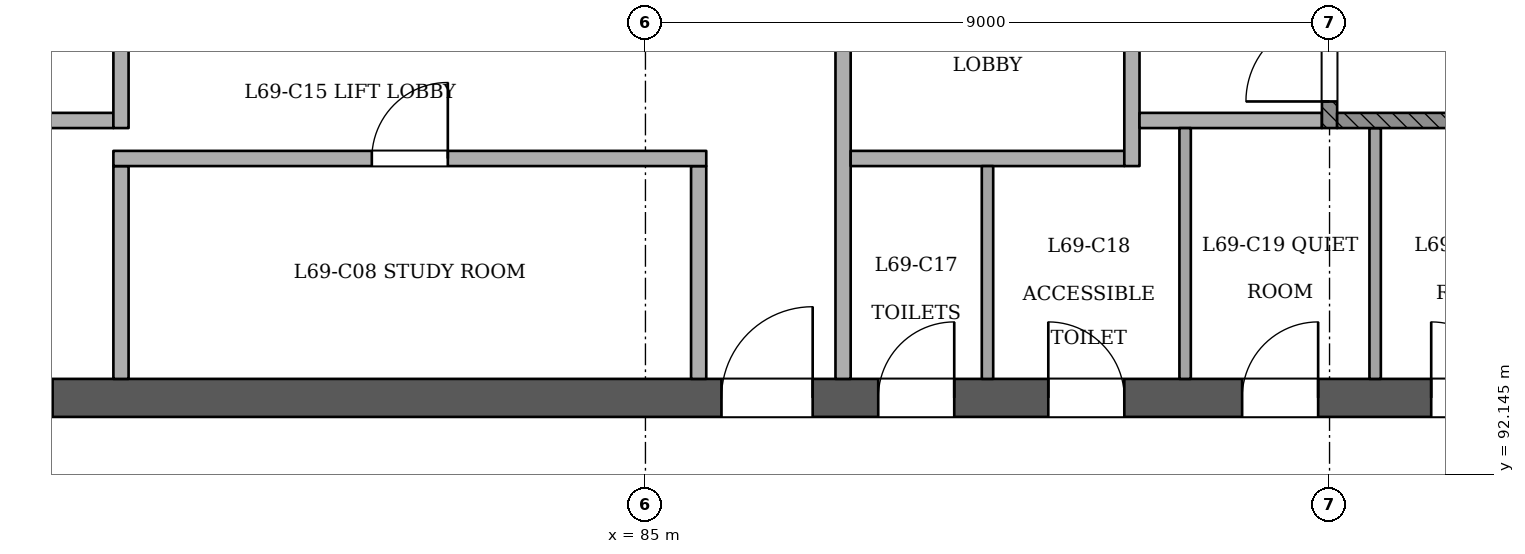
"""IFC4 building model, lengths in metres.
Left out: names, types, materials, properties, quantities, classifications, styles, units other than length and angle.
Written with IfcOpenShell. Run it as: python <this file> out.ifc"""

import sys

from ifc_helpers import new_model, si_unit, direction, frame, frame_2d, origin, place, context, subcontext, project, spatial, rectangle, extrude, element, fill, save


model = new_model("IFC4")
c1 = context("Model", 3, precision=1e-05, world=origin(), true_north=direction((0.0, 1.0)))
c2 = subcontext(c1, "Body", "Model", "MODEL_VIEW")
j1 = project(units=[si_unit("LENGTHUNIT", "METRE"), si_unit("PLANEANGLEUNIT", "RADIAN")], contexts=[c1])
p1 = place(None, origin())
s1 = spatial("IfcSite", under=j1, at=p1, CompositionType="ELEMENT")
p2 = place(p1, origin())
s2 = spatial("IfcBuilding", under=s1, at=p2, CompositionType="ELEMENT")
p3 = place(p2, frame((0.0, 0.0, 268.0)))
s3 = spatial("IfcBuildingStorey", under=s2, at=p3, CompositionType="ELEMENT", Elevation=268.0)
p4 = place(p3, frame((72.75, 93.15, 0.0), z_axis=(0.0, 0.0, 1.0), x_axis=(1.0, 0.0, 0.0)))
e1 = element("IfcWall", 1, at=p4, inside=s3, PredefinedType="SHEAR", context=c2, shape_type="SweptSolid", body=[
    extrude(rectangle(XDim=24.75, YDim=0.5, at=frame_2d((12.375, 0.0))), origin(), (0.0, 0.0, 1.0), 3.6),
])
p5 = place(p4, frame((1.05, 0.0, 0.0)))
e2 = element("IfcOpeningElement", 2, at=p5, cuts=e1, PredefinedType="OPENING", context=c2, shape_type="SweptSolid", body=[
    extrude(rectangle(XDim=1.2, YDim=2.1, at=frame_2d((0.6, 1.05))), frame((0.0, 0.26, 0.0), z_axis=(0.0, -1.0, 0.0), x_axis=(1.0, 0.0, 0.0)), (0.0, 0.0, 1.0), 0.521),
])
p6 = place(p4, frame((3.25, 0.0, 0.0)))
e3 = element("IfcOpeningElement", 3, at=p6, cuts=e1, PredefinedType="OPENING", context=c2, shape_type="SweptSolid", body=[
    extrude(rectangle(XDim=1.2, YDim=2.1, at=frame_2d((0.6, 1.05))), frame((0.0, 0.26, 0.0), z_axis=(0.0, -1.0, 0.0), x_axis=(1.0, 0.0, 0.0)), (0.0, 0.0, 1.0), 0.521),
])
p7 = place(p4, frame((13.25, 0.0, 0.0)))
e4 = element("IfcOpeningElement", 4, at=p7, cuts=e1, PredefinedType="OPENING", context=c2, shape_type="SweptSolid", body=[
    extrude(rectangle(XDim=1.2, YDim=2.1, at=frame_2d((0.6, 1.05))), frame((0.0, 0.26, 0.0), z_axis=(0.0, -1.0, 0.0), x_axis=(1.0, 0.0, 0.0)), (0.0, 0.0, 1.0), 0.521),
])
p8 = place(p4, frame((15.312, 0.0, 0.0)))
e5 = element("IfcOpeningElement", 5, at=p8, cuts=e1, PredefinedType="OPENING", context=c2, shape_type="SweptSolid", body=[
    extrude(rectangle(XDim=1.0, YDim=2.1, at=frame_2d((0.5, 1.05))), frame((0.0, 0.26, 0.0), z_axis=(0.0, -1.0, 0.0), x_axis=(1.0, 0.0, 0.0)), (0.0, 0.0, 1.0), 0.521),
])
p9 = place(p4, frame((17.55, 0.0, 0.0)))
e6 = element("IfcOpeningElement", 6, at=p9, cuts=e1, PredefinedType="OPENING", context=c2, shape_type="SweptSolid", body=[
    extrude(rectangle(XDim=1.0, YDim=2.1, at=frame_2d((0.5, 1.05))), frame((0.0, 0.26, 0.0), z_axis=(0.0, -1.0, 0.0), x_axis=(1.0, 0.0, 0.0)), (0.0, 0.0, 1.0), 0.521),
])
p10 = place(p4, frame((20.1, 0.0, 0.0)))
e7 = element("IfcOpeningElement", 7, at=p10, cuts=e1, PredefinedType="OPENING", context=c2, shape_type="SweptSolid", body=[
    extrude(rectangle(XDim=1.0, YDim=2.1, at=frame_2d((0.5, 1.05))), frame((0.0, 0.26, 0.0), z_axis=(0.0, -1.0, 0.0), x_axis=(1.0, 0.0, 0.0)), (0.0, 0.0, 1.0), 0.521),
])
p11 = place(p4, frame((22.587, 0.0, 0.0)))
e8 = element("IfcOpeningElement", 8, at=p11, cuts=e1, PredefinedType="OPENING", context=c2, shape_type="SweptSolid", body=[
    extrude(rectangle(XDim=1.0, YDim=2.1, at=frame_2d((0.5, 1.05))), frame((0.0, 0.26, 0.0), z_axis=(0.0, -1.0, 0.0), x_axis=(1.0, 0.0, 0.0)), (0.0, 0.0, 1.0), 0.521),
])
for number, where, z_axis, x_axis in (
    (9, (78.1, 93.4, 0.0), (0.0, 0.0, 1.0), (0.0, 1.0, 0.0)),
    (10, (85.7, 93.4, 0.0), (0.0, 0.0, 1.0), (0.0, 1.0, 0.0)),
):
    element("IfcWall", number, at=place(p3, frame(where, z_axis=z_axis, x_axis=x_axis)), inside=s3, PredefinedType="PARTITIONING", context=c2, shape_type="SweptSolid", body=[
        extrude(rectangle(XDim=2.8, YDim=0.2, at=frame_2d((1.4, 0.0))), origin(), (0.0, 0.0, 1.0), 3.2),
    ])
p12 = place(p3, frame((87.6, 93.4, 0.0), z_axis=(0.0, 0.0, 1.0), x_axis=(0.0, 1.0, 0.0)))
e11 = element("IfcWall", 11, at=p12, inside=s3, PredefinedType="PARTITIONING", context=c2, shape_type="SweptSolid", body=[
    extrude(rectangle(XDim=7.0, YDim=0.2, at=frame_2d((3.5, 0.0))), origin(), (0.0, 0.0, 1.0), 3.2),
])
p13 = place(p12, frame((4.45, 0.0, 0.0)))
e12 = element("IfcOpeningElement", 12, at=p13, cuts=e11, PredefinedType="OPENING", context=c2, shape_type="SweptSolid", body=[
    extrude(rectangle(XDim=1.1, YDim=2.1, at=frame_2d((0.55, 1.05))), frame((0.0, 0.11, 0.0), z_axis=(0.0, -1.0, 0.0), x_axis=(1.0, 0.0, 0.0)), (0.0, 0.0, 1.0), 0.221),
])
p14 = place(p3, frame((89.5, 93.4, 0.0), z_axis=(0.0, 0.0, 1.0), x_axis=(0.0, 1.0, 0.0)))
e13 = element("IfcWall", 13, at=p14, inside=s3, PredefinedType="PARTITIONING", context=c2, shape_type="SweptSolid", body=[
    extrude(rectangle(XDim=2.8, YDim=0.15, at=frame_2d((1.4, 0.0))), origin(), (0.0, 0.0, 1.0), 3.2),
])
for number, where, z_axis, x_axis in (
    (14, (92.1, 93.4, 0.0), (0.0, 0.0, 1.0), (0.0, 1.0, 0.0)),
    (15, (94.6, 93.4, 0.0), (0.0, 0.0, 1.0), (0.0, 1.0, 0.0)),
):
    element("IfcWall", number, at=place(p3, frame(where, z_axis=z_axis, x_axis=x_axis)), inside=s3, PredefinedType="PARTITIONING", context=c2, shape_type="SweptSolid", body=[
        extrude(rectangle(XDim=3.3, YDim=0.15, at=frame_2d((1.65, 0.0))), origin(), (0.0, 0.0, 1.0), 3.2),
    ])
p15 = place(p3, frame((78.0, 96.3, 0.0), z_axis=(0.0, 0.0, 1.0), x_axis=(1.0, 0.0, 0.0)))
e16 = element("IfcWall", 16, at=p15, inside=s3, PredefinedType="PARTITIONING", context=c2, shape_type="SweptSolid", body=[
    extrude(rectangle(XDim=7.8, YDim=0.2, at=frame_2d((3.9, 0.0))), origin(), (0.0, 0.0, 1.0), 3.2),
])
p16 = place(p15, frame((3.4, 0.0, 0.0)))
e17 = element("IfcOpeningElement", 17, at=p16, cuts=e16, PredefinedType="OPENING", context=c2, shape_type="SweptSolid", body=[
    extrude(rectangle(XDim=1.0, YDim=2.1, at=frame_2d((0.5, 1.05))), frame((0.0, 0.11, 0.0), z_axis=(0.0, -1.0, 0.0), x_axis=(1.0, 0.0, 0.0)), (0.0, 0.0, 1.0), 0.221),
])
p17 = place(p3, frame((87.7, 96.3, 0.0), z_axis=(0.0, 0.0, 1.0), x_axis=(1.0, 0.0, 0.0)))
e18 = element("IfcWall", 18, at=p17, inside=s3, PredefinedType="PARTITIONING", context=c2, shape_type="SweptSolid", body=[
    extrude(rectangle(XDim=3.6, YDim=0.2, at=frame_2d((1.8, 0.0))), origin(), (0.0, 0.0, 1.0), 3.2),
])
p18 = place(p3, frame((91.4, 96.2, 0.0), z_axis=(0.0, 0.0, 1.0), x_axis=(0.0, 1.0, 0.0)))
e19 = element("IfcWall", 19, at=p18, inside=s3, PredefinedType="PARTITIONING", context=c2, shape_type="SweptSolid", body=[
    extrude(rectangle(XDim=4.2, YDim=0.2, at=frame_2d((2.1, 0.0))), origin(), (0.0, 0.0, 1.0), 3.2),
])
p19 = place(p18, frame((2.45, 0.0, 0.0)))
e20 = element("IfcOpeningElement", 20, at=p19, cuts=e19, PredefinedType="OPENING", context=c2, shape_type="SweptSolid", body=[
    extrude(rectangle(XDim=1.1, YDim=2.1, at=frame_2d((0.55, 1.05))), frame((0.0, 0.11, 0.0), z_axis=(0.0, -1.0, 0.0), x_axis=(1.0, 0.0, 0.0)), (0.0, 0.0, 1.0), 0.221),
])
p20 = place(p3, frame((76.1, 96.8, 0.0), z_axis=(0.0, 0.0, 1.0), x_axis=(1.0, 0.0, 0.0)))
e21 = element("IfcWall", 21, at=p20, inside=s3, PredefinedType="PARTITIONING", context=c2, shape_type="SweptSolid", body=[
    extrude(rectangle(XDim=1.9, YDim=0.2, at=frame_2d((0.95, 0.0))), origin(), (0.0, 0.0, 1.0), 3.2),
])
p21 = place(p3, frame((78.1, 96.7, 0.0), z_axis=(0.0, 0.0, 1.0), x_axis=(0.0, 1.0, 0.0)))
e22 = element("IfcWall", 22, at=p21, inside=s3, PredefinedType="PARTITIONING", context=c2, shape_type="SweptSolid", body=[
    extrude(rectangle(XDim=3.7, YDim=0.2, at=frame_2d((1.85, 0.0))), origin(), (0.0, 0.0, 1.0), 3.2),
])
p22 = place(p21, frame((1.95, 0.0, 0.0)))
e23 = element("IfcOpeningElement", 23, at=p22, cuts=e22, PredefinedType="OPENING", context=c2, shape_type="SweptSolid", body=[
    extrude(rectangle(XDim=1.1, YDim=2.1, at=frame_2d((0.55, 1.05))), frame((0.0, 0.11, 0.0), z_axis=(0.0, -1.0, 0.0), x_axis=(1.0, 0.0, 0.0)), (0.0, 0.0, 1.0), 0.221),
])
p23 = place(p3, frame((91.5, 96.8, 0.0), z_axis=(0.0, 0.0, 1.0), x_axis=(1.0, 0.0, 0.0)))
e24 = element("IfcWall", 24, at=p23, inside=s3, PredefinedType="PARTITIONING", context=c2, shape_type="SweptSolid", body=[
    extrude(rectangle(XDim=2.4, YDim=0.2, at=frame_2d((1.2, 0.0))), origin(), (0.0, 0.0, 1.0), 3.2),
])
p24 = place(p3, frame((94.0, 96.7, 0.0), z_axis=(0.0, 0.0, 1.0), x_axis=(0.0, 1.0, 0.0)))
e25 = element("IfcWall", 25, at=p24, inside=s3, PredefinedType="SOLIDWALL", context=c2, shape_type="SweptSolid", body=[
    extrude(rectangle(XDim=3.7, YDim=0.2, at=frame_2d((1.85, 0.0))), origin(), (0.0, 0.0, 1.0), 3.2),
])
p25 = place(p24, frame((0.35, 0.0, 0.0)))
e26 = element("IfcOpeningElement", 26, at=p25, cuts=e25, PredefinedType="OPENING", context=c2, shape_type="SweptSolid", body=[
    extrude(rectangle(XDim=1.1, YDim=2.1, at=frame_2d((0.55, 1.05))), frame((0.0, 0.11, 0.0), z_axis=(0.0, -1.0, 0.0), x_axis=(1.0, 0.0, 0.0)), (0.0, 0.0, 1.0), 0.221),
])
p26 = place(p3, frame((94.1, 96.8, 0.0), z_axis=(0.0, 0.0, 1.0), x_axis=(1.0, 0.0, 0.0)))
e27 = element("IfcWall", 27, at=p26, inside=s3, PredefinedType="SOLIDWALL", context=c2, shape_type="SweptSolid", body=[
    extrude(rectangle(XDim=2.9, YDim=0.2, at=frame_2d((1.45, 0.0))), origin(), (0.0, 0.0, 1.0), 3.2),
])
p27 = place(p25, origin())
e28 = element("IfcDoor", 28, at=p27, inside=s3, OperationType="SINGLE_SWING_LEFT", PredefinedType="NOTDEFINED", context=c2, shape_type="SweptSolid", body=[
    extrude(rectangle(XDim=1.1, YDim=2.1, at=frame_2d((0.55, 1.05))), frame((0.0, 0.025, 0.0), z_axis=(0.0, -1.0, 0.0), x_axis=(1.0, 0.0, 0.0)), (0.0, 0.0, 1.0), 0.05),
])
fill(e26, e28)
p28 = place(p6, origin())
e29 = element("IfcDoor", 29, at=p28, inside=s3, OperationType="SINGLE_SWING_LEFT", PredefinedType="NOTDEFINED", context=c2, shape_type="SweptSolid", body=[
    extrude(rectangle(XDim=1.2, YDim=2.1, at=frame_2d((0.6, 1.05))), frame((0.0, 0.025, 0.0), z_axis=(0.0, -1.0, 0.0), x_axis=(1.0, 0.0, 0.0)), (0.0, 0.0, 1.0), 0.05),
])
fill(e3, e29)
p29 = place(p7, origin())
e30 = element("IfcDoor", 30, at=p29, inside=s3, OperationType="SINGLE_SWING_RIGHT", PredefinedType="NOTDEFINED", context=c2, shape_type="SweptSolid", body=[
    extrude(rectangle(XDim=1.2, YDim=2.1, at=frame_2d((0.6, 1.05))), frame((0.0, 0.025, 0.0), z_axis=(0.0, -1.0, 0.0), x_axis=(1.0, 0.0, 0.0)), (0.0, 0.0, 1.0), 0.05),
])
fill(e4, e30)
p30 = place(p8, origin())
e31 = element("IfcDoor", 31, at=p30, inside=s3, OperationType="SINGLE_SWING_RIGHT", PredefinedType="NOTDEFINED", context=c2, shape_type="SweptSolid", body=[
    extrude(rectangle(XDim=1.0, YDim=2.1, at=frame_2d((0.5, 1.05))), frame((0.0, 0.025, 0.0), z_axis=(0.0, -1.0, 0.0), x_axis=(1.0, 0.0, 0.0)), (0.0, 0.0, 1.0), 0.05),
])
fill(e5, e31)
p31 = place(p9, origin())
e32 = element("IfcDoor", 32, at=p31, inside=s3, OperationType="SINGLE_SWING_LEFT", PredefinedType="NOTDEFINED", context=c2, shape_type="SweptSolid", body=[
    extrude(rectangle(XDim=1.0, YDim=2.1, at=frame_2d((0.5, 1.05))), frame((0.0, 0.025, 0.0), z_axis=(0.0, -1.0, 0.0), x_axis=(1.0, 0.0, 0.0)), (0.0, 0.0, 1.0), 0.05),
])
fill(e6, e32)
p32 = place(p10, origin())
e33 = element("IfcDoor", 33, at=p32, inside=s3, OperationType="SINGLE_SWING_RIGHT", PredefinedType="NOTDEFINED", context=c2, shape_type="SweptSolid", body=[
    extrude(rectangle(XDim=1.0, YDim=2.1, at=frame_2d((0.5, 1.05))), frame((0.0, 0.025, 0.0), z_axis=(0.0, -1.0, 0.0), x_axis=(1.0, 0.0, 0.0)), (0.0, 0.0, 1.0), 0.05),
])
fill(e7, e33)
p33 = place(p11, origin())
e34 = element("IfcDoor", 34, at=p33, inside=s3, OperationType="SINGLE_SWING_LEFT", PredefinedType="NOTDEFINED", context=c2, shape_type="SweptSolid", body=[
    extrude(rectangle(XDim=1.0, YDim=2.1, at=frame_2d((0.5, 1.05))), frame((0.0, 0.025, 0.0), z_axis=(0.0, -1.0, 0.0), x_axis=(1.0, 0.0, 0.0)), (0.0, 0.0, 1.0), 0.05),
])
fill(e8, e34)
p34 = place(p16, origin())
e35 = element("IfcDoor", 35, at=p34, inside=s3, OperationType="SINGLE_SWING_RIGHT", PredefinedType="NOTDEFINED", context=c2, shape_type="SweptSolid", body=[
    extrude(rectangle(XDim=1.0, YDim=2.1, at=frame_2d((0.5, 1.05))), frame((0.0, 0.025, 0.0), z_axis=(0.0, -1.0, 0.0), x_axis=(1.0, 0.0, 0.0)), (0.0, 0.0, 1.0), 0.05),
])
fill(e17, e35)
save(model, sys.argv[1])
